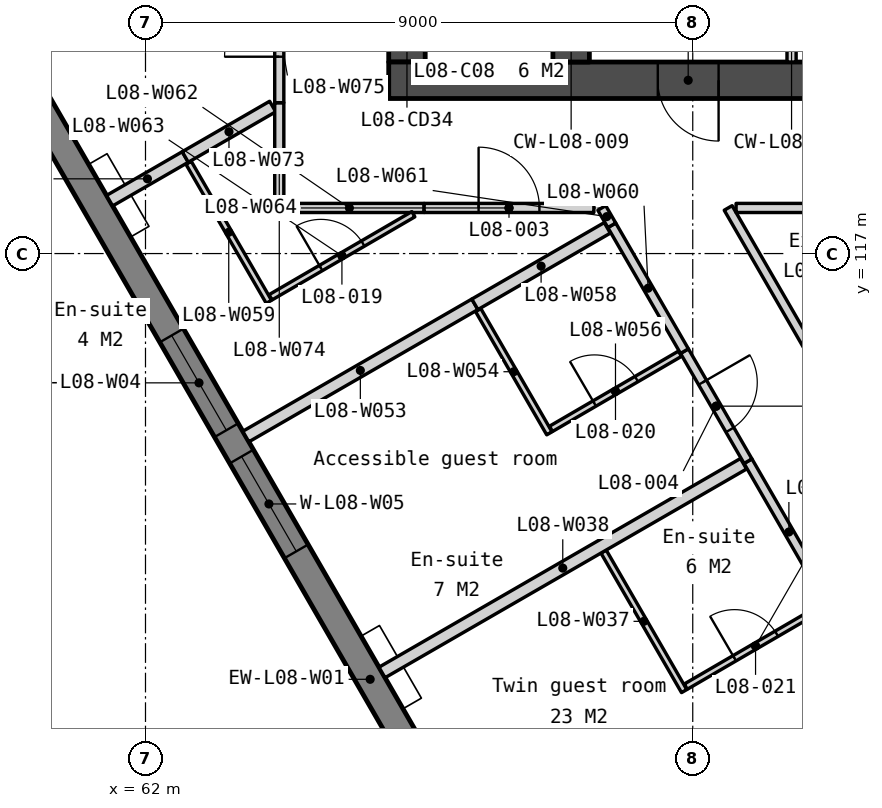
"""IFC4 building model, lengths in metres.
Left out: names, types, materials, properties, quantities, classifications, styles, units other than length and angle.
Written with IfcOpenShell. Run it as: python <this file> out.ifc"""

import sys

from ifc_helpers import new_model, si_unit, direction, frame, frame_2d, origin, place, context, subcontext, project, spatial, polyline, rectangle, outline, extrude, element, fill, save


model = new_model("IFC4")
c1 = context("Model", 3, precision=1e-05, world=origin(), true_north=direction((0.0, 1.0)))
c2 = subcontext(c1, "Body", "Model", "MODEL_VIEW")
j1 = project(units=[si_unit("LENGTHUNIT", "METRE"), si_unit("PLANEANGLEUNIT", "RADIAN")], contexts=[c1])
p1 = place(None, origin())
s1 = spatial("IfcSite", under=j1, at=p1, CompositionType="ELEMENT")
p2 = place(p1, origin())
s2 = spatial("IfcBuilding", under=s1, at=p2, CompositionType="ELEMENT")
p3 = place(p2, frame((0.0, 0.0, 42.0)))
s3 = spatial("IfcBuildingStorey", under=s2, at=p3, CompositionType="ELEMENT", Elevation=42.0)
p4 = place(p3, frame((66.3, 133.95, 0.0), z_axis=(0.0, 0.0, 1.0), x_axis=(0.0, -1.0, 0.0)))
e1 = element("IfcWall", 1, at=p4, inside=s3, PredefinedType="SOLIDWALL", context=c2, shape_type="SweptSolid", body=[
    extrude(rectangle(XDim=13.8, YDim=0.6, at=frame_2d((6.9, 0.0))), origin(), (0.0, 0.0, 1.0), 3.35),
])
p5 = place(p4, frame((0.6, 0.0, 0.0)))
e2 = element("IfcOpeningElement", 2, at=p5, cuts=e1, PredefinedType="OPENING", context=c2, shape_type="SweptSolid", body=[
    extrude(rectangle(XDim=1.1, YDim=2.1, at=frame_2d((0.55, 1.05))), frame((0.0, 0.31, 0.0), z_axis=(0.0, -1.0, 0.0), x_axis=(1.0, 0.0, 0.0)), (0.0, 0.0, 1.0), 0.62),
])
p6 = place(p4, frame((8.963, 0.0, 0.0)))
e3 = element("IfcOpeningElement", 3, at=p6, cuts=e1, PredefinedType="OPENING", context=c2, shape_type="SweptSolid", body=[
    extrude(rectangle(XDim=1.0, YDim=2.1, at=frame_2d((0.5, 1.05))), frame((0.0, 0.31, 0.0), z_axis=(0.0, -1.0, 0.0), x_axis=(1.0, 0.0, 0.0)), (0.0, 0.0, 1.0), 0.62),
])
p7 = place(p4, frame((11.888, 0.0, 0.0)))
e4 = element("IfcOpeningElement", 4, at=p7, cuts=e1, PredefinedType="OPENING", context=c2, shape_type="SweptSolid", body=[
    extrude(rectangle(XDim=1.0, YDim=2.1, at=frame_2d((0.5, 1.05))), frame((0.0, 0.31, 0.0), z_axis=(0.0, -1.0, 0.0), x_axis=(1.0, 0.0, 0.0)), (0.0, 0.0, 1.0), 0.62),
])
p8 = place(p3, frame((66.0, 119.85, 0.0), z_axis=(0.0, 0.0, 1.0), x_axis=(1.0, 0.0, 0.0)))
e5 = element("IfcWall", 5, at=p8, inside=s3, PredefinedType="SOLIDWALL", context=c2, shape_type="SweptSolid", body=[
    extrude(rectangle(XDim=28.0, YDim=0.6, at=frame_2d((14.0, 0.0))), origin(), (0.0, 0.0, 1.0), 3.35),
])
p9 = place(p8, frame((6.825, 0.0, 0.0)))
e6 = element("IfcOpeningElement", 6, at=p9, cuts=e5, PredefinedType="OPENING", context=c2, shape_type="SweptSolid", body=[
    extrude(rectangle(XDim=1.8, YDim=2.1, at=frame_2d((0.9, 1.05))), frame((0.0, 0.31, 0.0), z_axis=(0.0, -1.0, 0.0), x_axis=(1.0, 0.0, 0.0)), (0.0, 0.0, 1.0), 0.62),
])
p10 = place(p8, frame((15.85, 0.0, 0.0)))
e7 = element("IfcOpeningElement", 7, at=p10, cuts=e5, PredefinedType="OPENING", context=c2, shape_type="SweptSolid", body=[
    extrude(rectangle(XDim=1.5, YDim=2.1, at=frame_2d((0.75, 1.05))), frame((0.0, 0.31, 0.0), z_axis=(0.0, -1.0, 0.0), x_axis=(1.0, 0.0, 0.0)), (0.0, 0.0, 1.0), 0.62),
])
p11 = place(p8, frame((19.375, 0.0, 0.0)))
e8 = element("IfcOpeningElement", 8, at=p11, cuts=e5, PredefinedType="OPENING", context=c2, shape_type="SweptSolid", body=[
    extrude(rectangle(XDim=1.8, YDim=2.1, at=frame_2d((0.9, 1.05))), frame((0.0, 0.31, 0.0), z_axis=(0.0, -1.0, 0.0), x_axis=(1.0, 0.0, 0.0)), (0.0, 0.0, 1.0), 0.62),
])
p12 = place(p8, frame((4.425, 0.0, 0.0)))
e9 = element("IfcOpeningElement", 9, at=p12, cuts=e5, PredefinedType="OPENING", context=c2, shape_type="SweptSolid", body=[
    extrude(rectangle(XDim=1.0, YDim=2.1, at=frame_2d((0.5, 1.05))), frame((0.0, 0.31, 0.0), z_axis=(0.0, -1.0, 0.0), x_axis=(1.0, 0.0, 0.0)), (0.0, 0.0, 1.0), 0.62),
])
p13 = place(p8, frame((9.783, 0.0, 0.0)))
e10 = element("IfcOpeningElement", 10, at=p13, cuts=e5, PredefinedType="OPENING", context=c2, shape_type="SweptSolid", body=[
    extrude(rectangle(XDim=1.0, YDim=2.1, at=frame_2d((0.5, 1.05))), frame((0.0, 0.31, 0.0), z_axis=(0.0, -1.0, 0.0), x_axis=(1.0, 0.0, 0.0)), (0.0, 0.0, 1.0), 0.62),
])
p14 = place(p8, frame((11.525, 0.0, 0.0)))
e11 = element("IfcOpeningElement", 11, at=p14, cuts=e5, PredefinedType="OPENING", context=c2, shape_type="SweptSolid", body=[
    extrude(rectangle(XDim=1.0, YDim=2.1, at=frame_2d((0.5, 1.05))), frame((0.0, 0.31, 0.0), z_axis=(0.0, -1.0, 0.0), x_axis=(1.0, 0.0, 0.0)), (0.0, 0.0, 1.0), 0.62),
])
p15 = place(p8, frame((13.658, 0.0, 0.0)))
e12 = element("IfcOpeningElement", 12, at=p15, cuts=e5, PredefinedType="OPENING", context=c2, shape_type="SweptSolid", body=[
    extrude(rectangle(XDim=1.0, YDim=2.1, at=frame_2d((0.5, 1.05))), frame((0.0, 0.31, 0.0), z_axis=(0.0, -1.0, 0.0), x_axis=(1.0, 0.0, 0.0)), (0.0, 0.0, 1.0), 0.62),
])
p16 = place(p8, frame((22.575, 0.0, 0.0)))
e13 = element("IfcOpeningElement", 13, at=p16, cuts=e5, PredefinedType="OPENING", context=c2, shape_type="SweptSolid", body=[
    extrude(rectangle(XDim=1.0, YDim=2.1, at=frame_2d((0.5, 1.05))), frame((0.0, 0.31, 0.0), z_axis=(0.0, -1.0, 0.0), x_axis=(1.0, 0.0, 0.0)), (0.0, 0.0, 1.0), 0.62),
])
p17 = place(p3, frame((69.0, 122.25, 0.0), z_axis=(0.0, 0.0, 1.0), x_axis=(0.0, -1.0, 0.0)))
e14 = element("IfcWall", 14, at=p17, inside=s3, PredefinedType="SOLIDWALL", context=c2, shape_type="SweptSolid", body=[
    extrude(rectangle(XDim=2.1, YDim=0.6, at=frame_2d((1.05, 0.0))), origin(), (0.0, 0.0, 1.0), 3.35),
])
p18 = place(p3, frame((72.625, 122.25, 0.0), z_axis=(0.0, 0.0, 1.0), x_axis=(0.0, -1.0, 0.0)))
e15 = element("IfcWall", 15, at=p18, inside=s3, PredefinedType="PARTITIONING", context=c2, shape_type="SweptSolid", body=[
    extrude(rectangle(XDim=2.1, YDim=0.15, at=frame_2d((1.05, 0.0))), origin(), (0.0, 0.0, 1.0), 3.35),
])
p19 = place(p3, frame((54.495, 129.397, -0.15), z_axis=(0.0, 0.0, 1.0), x_axis=(0.499999201451, -0.866025864826, 0.0)))
e16 = element("IfcWall", 16, at=p19, inside=s3, PredefinedType="SOLIDWALL", context=c2, shape_type="SweptSolid", body=[
    extrude(outline(polyline([(44.8, 0.0), (44.8, 3.5), (0.0, 3.5), (0.0, 0.0), (44.8, 0.0)])), frame((0.0, 0.225, 0.0), z_axis=(0.0, -1.0, 0.0), x_axis=(1.0, 0.0, 0.0)), (0.0, 0.0, 1.0), 0.45),
])
p20 = place(p19, frame((0.786, 0.0, 1.05)))
e17 = element("IfcOpeningElement", 17, at=p20, cuts=e16, PredefinedType="OPENING", context=c2, shape_type="SweptSolid", body=[
    extrude(rectangle(XDim=1.2, YDim=1.5, at=frame_2d((0.6, 0.75))), frame((0.0, 0.235, 0.0), z_axis=(0.0, -1.0, 0.0), x_axis=(1.0, 0.0, 0.0)), (0.0, 0.0, 1.0), 0.47),
])
p21 = place(p19, frame((6.91, 0.0, 1.05)))
e18 = element("IfcOpeningElement", 18, at=p21, cuts=e16, PredefinedType="OPENING", context=c2, shape_type="SweptSolid", body=[
    extrude(rectangle(XDim=1.8, YDim=1.5, at=frame_2d((0.9, 0.75))), frame((0.0, 0.235, 0.0), z_axis=(0.0, -1.0, 0.0), x_axis=(1.0, 0.0, 0.0)), (0.0, 0.0, 1.0), 0.47),
])
p22 = place(p19, frame((9.21, 0.0, 1.05)))
e19 = element("IfcOpeningElement", 19, at=p22, cuts=e16, PredefinedType="OPENING", context=c2, shape_type="SweptSolid", body=[
    extrude(rectangle(XDim=1.8, YDim=1.5, at=frame_2d((0.9, 0.75))), frame((0.0, 0.235, 0.0), z_axis=(0.0, -1.0, 0.0), x_axis=(1.0, 0.0, 0.0)), (0.0, 0.0, 1.0), 0.47),
])
p23 = place(p19, frame((15.87, 0.0, 1.05)))
e20 = element("IfcOpeningElement", 20, at=p23, cuts=e16, PredefinedType="OPENING", context=c2, shape_type="SweptSolid", body=[
    extrude(rectangle(XDim=1.8, YDim=1.5, at=frame_2d((0.9, 0.75))), frame((0.0, 0.235, 0.0), z_axis=(0.0, -1.0, 0.0), x_axis=(1.0, 0.0, 0.0)), (0.0, 0.0, 1.0), 0.47),
])
p24 = place(p19, frame((18.17, 0.0, 1.05)))
e21 = element("IfcOpeningElement", 21, at=p24, cuts=e16, PredefinedType="OPENING", context=c2, shape_type="SweptSolid", body=[
    extrude(rectangle(XDim=1.8, YDim=1.5, at=frame_2d((0.9, 0.75))), frame((0.0, 0.235, 0.0), z_axis=(0.0, -1.0, 0.0), x_axis=(1.0, 0.0, 0.0)), (0.0, 0.0, 1.0), 0.47),
])
p25 = place(p19, frame((24.83, 0.0, 1.05)))
e22 = element("IfcOpeningElement", 22, at=p25, cuts=e16, PredefinedType="OPENING", context=c2, shape_type="SweptSolid", body=[
    extrude(rectangle(XDim=1.8, YDim=1.5, at=frame_2d((0.9, 0.75))), frame((0.0, 0.235, 0.0), z_axis=(0.0, -1.0, 0.0), x_axis=(1.0, 0.0, 0.0)), (0.0, 0.0, 1.0), 0.47),
])
p26 = place(p19, frame((27.13, 0.0, 1.05)))
e23 = element("IfcOpeningElement", 23, at=p26, cuts=e16, PredefinedType="OPENING", context=c2, shape_type="SweptSolid", body=[
    extrude(rectangle(XDim=1.8, YDim=1.5, at=frame_2d((0.9, 0.75))), frame((0.0, 0.235, 0.0), z_axis=(0.0, -1.0, 0.0), x_axis=(1.0, 0.0, 0.0)), (0.0, 0.0, 1.0), 0.47),
])
p27 = place(p19, frame((33.79, 0.0, 1.05)))
e24 = element("IfcOpeningElement", 24, at=p27, cuts=e16, PredefinedType="OPENING", context=c2, shape_type="SweptSolid", body=[
    extrude(rectangle(XDim=1.8, YDim=1.5, at=frame_2d((0.9, 0.75))), frame((0.0, 0.235, 0.0), z_axis=(0.0, -1.0, 0.0), x_axis=(1.0, 0.0, 0.0)), (0.0, 0.0, 1.0), 0.47),
])
p28 = place(p19, frame((36.09, 0.0, 1.05)))
e25 = element("IfcOpeningElement", 25, at=p28, cuts=e16, PredefinedType="OPENING", context=c2, shape_type="SweptSolid", body=[
    extrude(rectangle(XDim=1.8, YDim=1.5, at=frame_2d((0.9, 0.75))), frame((0.0, 0.235, 0.0), z_axis=(0.0, -1.0, 0.0), x_axis=(1.0, 0.0, 0.0)), (0.0, 0.0, 1.0), 0.47),
])
p29 = place(p19, frame((42.814, 0.0, 1.05)))
e26 = element("IfcOpeningElement", 26, at=p29, cuts=e16, PredefinedType="OPENING", context=c2, shape_type="SweptSolid", body=[
    extrude(rectangle(XDim=1.2, YDim=1.5, at=frame_2d((0.6, 0.75))), frame((0.0, 0.235, 0.0), z_axis=(0.0, -1.0, 0.0), x_axis=(1.0, 0.0, 0.0)), (0.0, 0.0, 1.0), 0.47),
])
p30 = place(p3, frame((69.534, 112.099, 0.0), z_axis=(0.0, 0.0, 1.0), x_axis=(0.499993606316, -0.866029095148, 0.0)))
e27 = element("IfcWall", 27, at=p30, inside=s3, PredefinedType="PARTITIONING", context=c2, shape_type="SweptSolid", body=[
    extrude(rectangle(XDim=2.65, YDim=0.1, at=frame_2d((1.325, 0.0))), origin(), (0.0, 0.0, 1.0), 3.35),
])
p31 = place(p3, frame((65.89, 110.11, 0.0), z_axis=(0.0, 0.0, 1.0), x_axis=(0.86603516302, 0.499983096127, 0.0)))
e28 = element("IfcWall", 28, at=p31, inside=s3, PredefinedType="PARTITIONING", context=c2, shape_type="SweptSolid", body=[
    extrude(rectangle(XDim=6.865, YDim=0.2, at=frame_2d((3.433, 0.0))), origin(), (0.0, 0.0, 1.0), 3.35),
])
p32 = place(p3, frame((70.885, 109.877, 0.0), z_axis=(0.0, 0.0, 1.0), x_axis=(0.864248761918, 0.503064685228, 0.0)))
e29 = element("IfcWall", 29, at=p32, inside=s3, PredefinedType="PARTITIONING", context=c2, shape_type="SweptSolid", body=[
    extrude(rectangle(XDim=2.655, YDim=0.1, at=frame_2d((1.328, 0.0))), origin(), (0.0, 0.0, 1.0), 3.35),
])
p33 = place(p32, frame((0.927, 0.0, 0.0)))
e30 = element("IfcOpeningElement", 30, at=p33, cuts=e29, PredefinedType="OPENING", context=c2, shape_type="SweptSolid", body=[
    extrude(rectangle(XDim=0.8, YDim=2.1, at=frame_2d((0.4, 1.05))), frame((0.0, 0.06, 0.0), z_axis=(0.0, -1.0, 0.0), x_axis=(1.0, 0.0, 0.0)), (0.0, 0.0, 1.0), 0.12),
])
p34 = place(p3, frame((71.909, 113.585, 0.0), z_axis=(0.0, 0.0, 1.0), x_axis=(0.499994808408, -0.866028401131, 0.0)))
e31 = element("IfcWall", 31, at=p34, inside=s3, PredefinedType="PARTITIONING", context=c2, shape_type="SweptSolid", body=[
    extrude(rectangle(XDim=2.69, YDim=0.15, at=frame_2d((1.345, 0.0))), origin(), (0.0, 0.0, 1.0), 3.35),
])
p35 = place(p3, frame((70.864, 115.395, 0.0), z_axis=(0.0, 0.0, 1.0), x_axis=(0.500046000743, -0.865998843614, 0.0)))
e32 = element("IfcWall", 32, at=p35, inside=s3, PredefinedType="PARTITIONING", context=c2, shape_type="SweptSolid", body=[
    extrude(rectangle(XDim=2.09, YDim=0.15, at=frame_2d((1.045, 0.0))), origin(), (0.0, 0.0, 1.0), 3.35),
])
p36 = place(p35, frame((0.595, 0.0, 0.0)))
e33 = element("IfcOpeningElement", 33, at=p36, cuts=e32, PredefinedType="OPENING", context=c2, shape_type="SweptSolid", body=[
    extrude(rectangle(XDim=0.9, YDim=2.1, at=frame_2d((0.45, 1.05))), frame((0.0, 0.085, 0.0), z_axis=(0.0, -1.0, 0.0), x_axis=(1.0, 0.0, 0.0)), (0.0, 0.0, 1.0), 0.17),
])
p37 = place(p3, frame((63.65, 113.99, 0.0), z_axis=(0.0, 0.0, 1.0), x_axis=(0.866027639635, 0.499996127374, 0.0)))
e34 = element("IfcWall", 34, at=p37, inside=s3, PredefinedType="PARTITIONING", context=c2, shape_type="SweptSolid", body=[
    extrude(rectangle(XDim=4.35, YDim=0.2, at=frame_2d((2.175, 0.0))), origin(), (0.0, 0.0, 1.0), 3.35),
])
p38 = place(p3, frame((67.472, 116.07, 0.0), z_axis=(0.0, 0.0, 1.0), x_axis=(0.499954256575, -0.866051812152, 0.0)))
e35 = element("IfcWall", 35, at=p38, inside=s3, PredefinedType="PARTITIONING", context=c2, shape_type="SweptSolid", body=[
    extrude(rectangle(XDim=2.34, YDim=0.1, at=frame_2d((1.17, 0.0))), origin(), (0.0, 0.0, 1.0), 3.35),
])
p39 = place(p3, frame((68.669, 114.117, 0.0), z_axis=(0.0, 0.0, 1.0), x_axis=(0.864063696467, 0.503382487227, 0.0)))
e36 = element("IfcWall", 36, at=p39, inside=s3, PredefinedType="PARTITIONING", context=c2, shape_type="SweptSolid", body=[
    extrude(rectangle(XDim=2.455, YDim=0.1, at=frame_2d((1.228, 0.0))), origin(), (0.0, 0.0, 1.0), 3.35),
])
p40 = place(p39, frame((0.827, 0.0, 0.0)))
e37 = element("IfcOpeningElement", 37, at=p40, cuts=e36, PredefinedType="OPENING", context=c2, shape_type="SweptSolid", body=[
    extrude(rectangle(XDim=0.8, YDim=2.1, at=frame_2d((0.4, 1.05))), frame((0.0, 0.06, 0.0), z_axis=(0.0, -1.0, 0.0), x_axis=(1.0, 0.0, 0.0)), (0.0, 0.0, 1.0), 0.12),
])
p41 = place(p3, frame((67.417, 116.165, 0.0), z_axis=(0.0, 0.0, 1.0), x_axis=(0.866006140796, 0.500033362991, 0.0)))
e38 = element("IfcWall", 38, at=p41, inside=s3, PredefinedType="PARTITIONING", context=c2, shape_type="SweptSolid", body=[
    extrude(rectangle(XDim=2.515, YDim=0.2, at=frame_2d((1.257, 0.0))), origin(), (0.0, 0.0, 1.0), 3.35),
])
p42 = place(p3, frame((62.709, 118.493, 0.0), z_axis=(0.0, 0.0, 1.0), x_axis=(0.500048002682, -0.865997687649, 0.0)))
e39 = element("IfcWall", 39, at=p42, inside=s3, PredefinedType="PARTITIONING", context=c2, shape_type="SweptSolid", body=[
    extrude(rectangle(XDim=2.64, YDim=0.1, at=frame_2d((1.32, 0.0))), origin(), (0.0, 0.0, 1.0), 3.35),
])
p43 = place(p3, frame((69.669, 117.465, 0.0), z_axis=(0.0, 0.0, 1.0), x_axis=(0.499940577336, -0.866059708757, 0.0)))
e40 = element("IfcWall", 40, at=p43, inside=s3, PredefinedType="PARTITIONING", context=c2, shape_type="SweptSolid", body=[
    extrude(rectangle(XDim=2.39, YDim=0.15, at=frame_2d((1.195, 0.0))), origin(), (0.0, 0.0, 1.0), 3.35),
])
p44 = place(p3, frame((69.504, 117.75, 0.0), z_axis=(0.0, 0.0, 1.0), x_axis=(0.500129239174, -0.865950774653, 0.0)))
e41 = element("IfcWall", 41, at=p44, inside=s3, PredefinedType="PARTITIONING", context=c2, shape_type="SweptSolid", body=[
    extrude(rectangle(XDim=0.329, YDim=0.15, at=frame_2d((0.165, 0.0))), origin(), (0.0, 0.0, 1.0), 3.35),
])
p45 = place(p3, frame((64.125, 117.75, 0.0), z_axis=(0.0, 0.0, 1.0), x_axis=(1.0, 0.0, 0.0)))
e42 = element("IfcWall", 42, at=p45, inside=s3, PredefinedType="PARTITIONING", context=c2, shape_type="SweptSolid", body=[
    extrude(rectangle(XDim=2.457, YDim=0.15, at=frame_2d((1.229, 0.0))), origin(), (0.0, 0.0, 1.0), 3.35),
])
p46 = place(p3, frame((64.056, 116.28, 0.0), z_axis=(0.0, 0.0, 1.0), x_axis=(0.864358276906, 0.50287649492, 0.0)))
e43 = element("IfcWall", 43, at=p46, inside=s3, PredefinedType="PARTITIONING", context=c2, shape_type="SweptSolid", body=[
    extrude(rectangle(XDim=2.718, YDim=0.1, at=frame_2d((1.359, 0.0))), origin(), (0.0, 0.0, 1.0), 3.35),
])
p47 = place(p46, frame((0.959, 0.0, 0.0)))
e44 = element("IfcOpeningElement", 44, at=p47, cuts=e43, PredefinedType="OPENING", context=c2, shape_type="SweptSolid", body=[
    extrude(rectangle(XDim=0.8, YDim=2.1, at=frame_2d((0.4, 1.05))), frame((0.0, 0.06, 0.0), z_axis=(0.0, -1.0, 0.0), x_axis=(1.0, 0.0, 0.0)), (0.0, 0.0, 1.0), 0.12),
])
p48 = place(p3, frame((66.582, 117.75, 0.0), z_axis=(0.0, 0.0, 1.0), x_axis=(1.0, 0.0, 0.0)))
e45 = element("IfcWall", 45, at=p48, inside=s3, PredefinedType="PARTITIONING", context=c2, shape_type="SweptSolid", body=[
    extrude(rectangle(XDim=2.792, YDim=0.15, at=frame_2d((1.396, 0.0))), origin(), (0.0, 0.0, 1.0), 3.35),
])
p49 = place(p48, frame((0.896, 0.0, 0.0)))
e46 = element("IfcOpeningElement", 46, at=p49, cuts=e45, PredefinedType="OPENING", context=c2, shape_type="SweptSolid", body=[
    extrude(rectangle(XDim=1.0, YDim=2.1, at=frame_2d((0.5, 1.05))), frame((0.0, 0.085, 0.0), z_axis=(0.0, -1.0, 0.0), x_axis=(1.0, 0.0, 0.0)), (0.0, 0.0, 1.0), 0.17),
])
p50 = place(p3, frame((71.583, 117.75, 0.0), z_axis=(0.0, 0.0, 1.0), x_axis=(0.500001770766, -0.86602438143, 0.0)))
e47 = element("IfcWall", 47, at=p50, inside=s3, PredefinedType="PARTITIONING", context=c2, shape_type="SweptSolid", body=[
    extrude(rectangle(XDim=13.745, YDim=0.15, at=frame_2d((6.873, 0.0))), origin(), (0.0, 0.0, 1.0), 3.35),
])
p51 = place(p50, frame((6.422, 0.0, 0.0)))
e48 = element("IfcOpeningElement", 48, at=p51, cuts=e47, PredefinedType="OPENING", context=c2, shape_type="SweptSolid", body=[
    extrude(rectangle(XDim=0.9, YDim=2.1, at=frame_2d((0.45, 1.05))), frame((0.0, 0.085, 0.0), z_axis=(0.0, -1.0, 0.0), x_axis=(1.0, 0.0, 0.0)), (0.0, 0.0, 1.0), 0.17),
])
p52 = place(p3, frame((71.712, 117.75, 0.0), z_axis=(0.0, 0.0, 1.0), x_axis=(1.0, 0.0, 0.0)))
e49 = element("IfcWall", 49, at=p52, inside=s3, PredefinedType="PARTITIONING", context=c2, shape_type="SweptSolid", body=[
    extrude(rectangle(XDim=6.743, YDim=0.15, at=frame_2d((3.371, 0.0))), origin(), (0.0, 0.0, 1.0), 3.35),
])
p53 = place(p3, frame((61.41, 117.87, 0.0), z_axis=(0.0, 0.0, 1.0), x_axis=(0.866007328409, 0.500031306162, 0.0)))
e50 = element("IfcWall", 50, at=p53, inside=s3, PredefinedType="PARTITIONING", context=c2, shape_type="SweptSolid", body=[
    extrude(rectangle(XDim=1.437, YDim=0.2, at=frame_2d((0.719, 0.0))), origin(), (0.0, 0.0, 1.0), 3.35),
])
p54 = place(p3, frame((62.654, 118.588, 0.0), z_axis=(0.0, 0.0, 1.0), x_axis=(0.866090081402, 0.499887958344, 0.0)))
e51 = element("IfcWall", 51, at=p54, inside=s3, PredefinedType="PARTITIONING", context=c2, shape_type="SweptSolid", body=[
    extrude(rectangle(XDim=1.66, YDim=0.2, at=frame_2d((0.83, 0.0))), origin(), (0.0, 0.0, 1.0), 3.35),
])
p55 = place(p3, frame((64.2, 117.825, 0.0), z_axis=(0.0, 0.0, 1.0), x_axis=(0.0, 1.0, 0.0)))
e52 = element("IfcWall", 52, at=p55, inside=s3, PredefinedType="PARTITIONING", context=c2, shape_type="SweptSolid", body=[
    extrude(rectangle(XDim=1.656, YDim=0.15, at=frame_2d((0.828, 0.0))), origin(), (0.0, 0.0, 1.0), 3.35),
])
p56 = place(p3, frame((64.2, 119.481, 0.0), z_axis=(0.0, 0.0, 1.0), x_axis=(0.0, 1.0, 0.0)))
e53 = element("IfcWall", 53, at=p56, inside=s3, PredefinedType="PARTITIONING", context=c2, shape_type="SweptSolid", body=[
    extrude(rectangle(XDim=2.413, YDim=0.15, at=frame_2d((1.207, 0.0))), origin(), (0.0, 0.0, 1.0), 3.35),
])
p57 = place(p56, frame((0.757, 0.0, 0.0)))
e54 = element("IfcOpeningElement", 54, at=p57, cuts=e53, PredefinedType="OPENING", context=c2, shape_type="SweptSolid", body=[
    extrude(rectangle(XDim=0.9, YDim=2.1, at=frame_2d((0.45, 1.05))), frame((0.0, 0.085, 0.0), z_axis=(0.0, -1.0, 0.0), x_axis=(1.0, 0.0, 0.0)), (0.0, 0.0, 1.0), 0.17),
])
p58 = place(p12, origin())
e55 = element("IfcDoor", 55, at=p58, inside=s3, OperationType="SINGLE_SWING_RIGHT", PredefinedType="DOOR", context=c2, shape_type="SweptSolid", body=[
    extrude(rectangle(XDim=1.0, YDim=2.1, at=frame_2d((0.5, 1.05))), frame((0.0, 0.025, 0.0), z_axis=(0.0, -1.0, 0.0), x_axis=(1.0, 0.0, 0.0)), (0.0, 0.0, 1.0), 0.05),
])
fill(e9, e55)
p59 = place(p23, origin())
e56 = element("IfcWindow", 56, at=p59, inside=s3, PartitioningType="SINGLE_PANEL", PredefinedType="WINDOW", context=c2, shape_type="SweptSolid", body=[
    extrude(rectangle(XDim=1.8, YDim=1.5, at=frame_2d((0.9, 0.75))), frame((0.0, 0.03, 0.0), z_axis=(0.0, -1.0, 0.0), x_axis=(1.0, 0.0, 0.0)), (0.0, 0.0, 1.0), 0.06),
])
fill(e20, e56)
p60 = place(p24, origin())
e57 = element("IfcWindow", 57, at=p60, inside=s3, PartitioningType="SINGLE_PANEL", PredefinedType="WINDOW", context=c2, shape_type="SweptSolid", body=[
    extrude(rectangle(XDim=1.8, YDim=1.5, at=frame_2d((0.9, 0.75))), frame((0.0, 0.03, 0.0), z_axis=(0.0, -1.0, 0.0), x_axis=(1.0, 0.0, 0.0)), (0.0, 0.0, 1.0), 0.06),
])
fill(e21, e57)
p61 = place(p57, origin())
e58 = element("IfcDoor", 58, at=p61, inside=s3, OperationType="SINGLE_SWING_LEFT", PredefinedType="DOOR", context=c2, shape_type="SweptSolid", body=[
    extrude(rectangle(XDim=0.9, YDim=2.1, at=frame_2d((0.45, 1.05))), frame((0.0, 0.025, 0.0), z_axis=(0.0, -1.0, 0.0), x_axis=(1.0, 0.0, 0.0)), (0.0, 0.0, 1.0), 0.05),
])
fill(e54, e58)
p62 = place(p49, origin())
e59 = element("IfcDoor", 59, at=p62, inside=s3, OperationType="SINGLE_SWING_LEFT", PredefinedType="DOOR", context=c2, shape_type="SweptSolid", body=[
    extrude(rectangle(XDim=1.0, YDim=2.1, at=frame_2d((0.5, 1.05))), frame((0.0, 0.025, 0.0), z_axis=(0.0, -1.0, 0.0), x_axis=(1.0, 0.0, 0.0)), (0.0, 0.0, 1.0), 0.05),
])
fill(e46, e59)
p63 = place(p36, origin())
e60 = element("IfcDoor", 60, at=p63, inside=s3, OperationType="SINGLE_SWING_LEFT", PredefinedType="DOOR", context=c2, shape_type="SweptSolid", body=[
    extrude(rectangle(XDim=0.9, YDim=2.1, at=frame_2d((0.45, 1.05))), frame((0.0, 0.025, 0.0), z_axis=(0.0, -1.0, 0.0), x_axis=(1.0, 0.0, 0.0)), (0.0, 0.0, 1.0), 0.05),
])
fill(e33, e60)
p64 = place(p47, origin())
e61 = element("IfcDoor", 61, at=p64, inside=s3, OperationType="SINGLE_SWING_LEFT", PredefinedType="DOOR", context=c2, shape_type="SweptSolid", body=[
    extrude(rectangle(XDim=0.8, YDim=2.1, at=frame_2d((0.4, 1.05))), frame((0.0, 0.025, 0.0), z_axis=(0.0, -1.0, 0.0), x_axis=(1.0, 0.0, 0.0)), (0.0, 0.0, 1.0), 0.05),
])
fill(e44, e61)
p65 = place(p40, origin())
e62 = element("IfcDoor", 62, at=p65, inside=s3, OperationType="SINGLE_SWING_LEFT", PredefinedType="DOOR", context=c2, shape_type="SweptSolid", body=[
    extrude(rectangle(XDim=0.8, YDim=2.1, at=frame_2d((0.4, 1.05))), frame((0.0, 0.025, 0.0), z_axis=(0.0, -1.0, 0.0), x_axis=(1.0, 0.0, 0.0)), (0.0, 0.0, 1.0), 0.05),
])
fill(e37, e62)
p66 = place(p33, origin())
e63 = element("IfcDoor", 63, at=p66, inside=s3, OperationType="SINGLE_SWING_LEFT", PredefinedType="DOOR", context=c2, shape_type="SweptSolid", body=[
    extrude(rectangle(XDim=0.8, YDim=2.1, at=frame_2d((0.4, 1.05))), frame((0.0, 0.025, 0.0), z_axis=(0.0, -1.0, 0.0), x_axis=(1.0, 0.0, 0.0)), (0.0, 0.0, 1.0), 0.05),
])
fill(e30, e63)
save(model, sys.argv[1])
